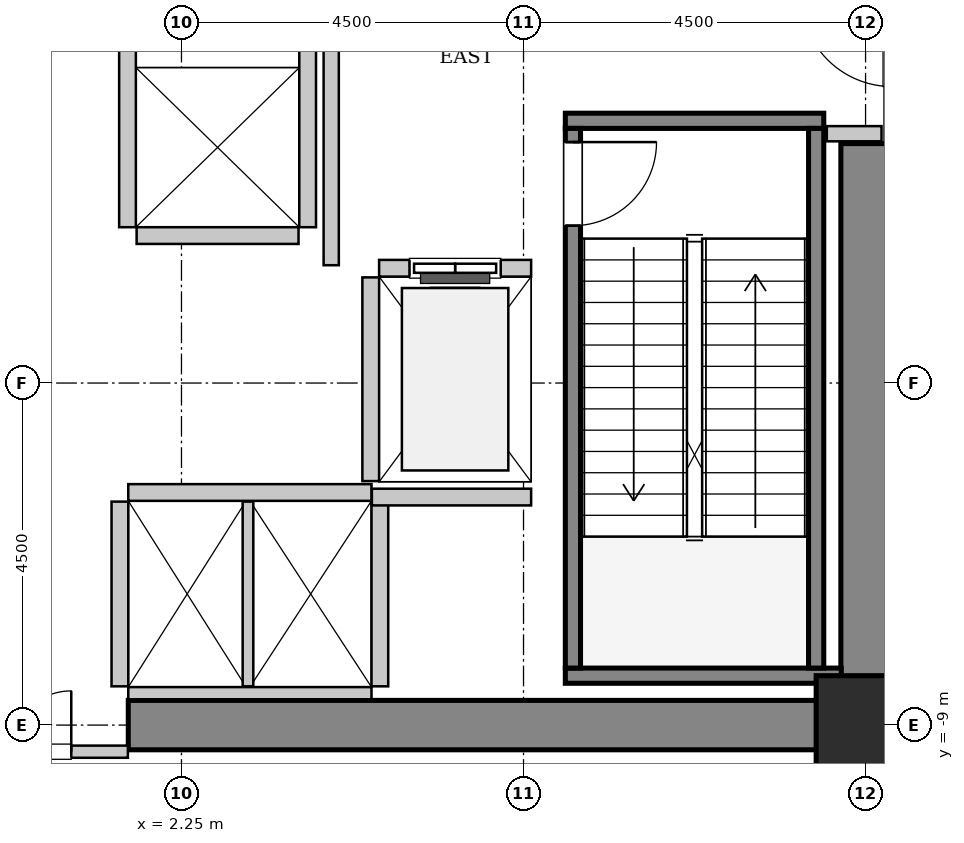
"""IFC4 building model, lengths in metres.
Left out: names, types, materials, properties, quantities, classifications, styles, units other than length and angle.
Written with IfcOpenShell. Run it as: python <this file> out.ifc"""

import sys

from ifc_helpers import new_model, si_unit, direction, frame, frame_2d, origin, origin_2d, place, context, subcontext, project, spatial, rectangle, hollow_rectangle, extrude, source, transform, mapped, element, fill, save


model = new_model("IFC4")
c1 = context("Model", 3, precision=1e-05, world=origin(), true_north=direction((0.0, 1.0)))
c2 = subcontext(c1, "Body", "Model", "MODEL_VIEW")
j1 = project(units=[si_unit("LENGTHUNIT", "METRE"), si_unit("PLANEANGLEUNIT", "RADIAN")], contexts=[c1])
p1 = place(None, origin())
s1 = spatial("IfcSite", under=j1, at=p1, CompositionType="ELEMENT")
p2 = place(p1, origin())
s2 = spatial("IfcBuilding", under=s1, at=p2, CompositionType="ELEMENT")
p3 = place(p2, frame((0.0, 0.0, 11.4)))
s3 = spatial("IfcBuildingStorey", under=s2, at=p3, CompositionType="ELEMENT", Elevation=11.4)
m1 = source(origin(), c2, "Body", "SweptSolid", [
    extrude(rectangle(XDim=10.025, YDim=0.65, at=frame_2d((5.012, 0.0))), origin(), (0.0, 0.0, 1.0), 5.4),
])
p4 = place(p3, frame((1.55, -9.0, 0.0), z_axis=(0.0, 0.0, 1.0), x_axis=(1.0, 0.0, 0.0)))
e1 = element("IfcWall", 1, at=p4, inside=s3, PredefinedType="SHEAR", context=c2, shape_type="MappedRepresentation", body=[
    mapped(m1, transform((0.0, 0.0, 0.0), x_axis=(1.0, 0.0, 0.0), y_axis=(0.0, 1.0, 0.0), z_axis=(0.0, 0.0, 1.0), scale=1.0)),
])
m2 = source(origin(), c2, "Body", "SweptSolid", [
    extrude(rectangle(XDim=7.325, YDim=0.65, at=frame_2d((3.663, 0.0))), origin(), (0.0, 0.0, 1.0), 5.4),
])
p5 = place(p3, frame((11.25, -8.675, 0.0), z_axis=(0.0, 0.0, 1.0), x_axis=(0.0, 1.0, 0.0)))
e2 = element("IfcWall", 2, at=p5, inside=s3, PredefinedType="SHEAR", context=c2, shape_type="MappedRepresentation", body=[
    mapped(m2, transform((0.0, 0.0, 0.0), x_axis=(1.0, 0.0, 0.0), y_axis=(0.0, 1.0, 0.0), z_axis=(0.0, 0.0, 1.0), scale=1.0)),
])
m3 = source(origin(), c2, "Body", "SweptSolid", [
    extrude(hollow_rectangle(XDim=1.3, YDim=1.3, WallThickness=0.065, InnerFilletRadius=0.065, OuterFilletRadius=0.13, at=origin_2d()), origin(), (0.0, 0.0, 1.0), 5.4),
])
p6 = place(p3, frame((11.25, -9.0, 0.0), z_axis=(0.0, 0.0, 1.0), x_axis=(1.0, 0.0, 0.0)))
e3 = element("IfcColumn", 3, at=p6, inside=s3, PredefinedType="COLUMN", context=c2, shape_type="MappedRepresentation", body=[
    mapped(m3, transform((0.0, 0.0, 0.0), x_axis=(1.0, 0.0, 0.0), y_axis=(0.0, 1.0, 0.0), z_axis=(0.0, 0.0, 1.0), scale=1.0)),
])
m4 = source(origin(), c2, "Body", "SweptSolid", [
    extrude(rectangle(XDim=3.4, YDim=0.2, at=frame_2d((1.7, 0.0))), origin(), (0.0, 0.0, 1.0), 5.4),
])
p7 = place(p3, frame((7.3, -1.05, 0.0), z_axis=(0.0, 0.0, 1.0), x_axis=(1.0, 0.0, 0.0)))
e4 = element("IfcWall", 4, at=p7, inside=s3, PredefinedType="SOLIDWALL", context=c2, shape_type="MappedRepresentation", body=[
    mapped(m4, transform((0.0, 0.0, 0.0), x_axis=(1.0, 0.0, 0.0), y_axis=(0.0, 1.0, 0.0), z_axis=(0.0, 0.0, 1.0), scale=1.0)),
])
m5 = source(origin(), c2, "Body", "SweptSolid", [
    extrude(rectangle(XDim=3.63, YDim=0.2, at=frame_2d((1.815, 0.0))), origin(), (0.0, 0.0, 1.0), 5.4),
])
p8 = place(p3, frame((7.3, -8.35, 0.0), z_axis=(0.0, 0.0, 1.0), x_axis=(1.0, 0.0, 0.0)))
e5 = element("IfcWall", 5, at=p8, inside=s3, PredefinedType="SOLIDWALL", context=c2, shape_type="MappedRepresentation", body=[
    mapped(m5, transform((0.0, 0.0, 0.0), x_axis=(1.0, 0.0, 0.0), y_axis=(0.0, 1.0, 0.0), z_axis=(0.0, 0.0, 1.0), scale=1.0)),
])
m6 = source(origin(), c2, "Body", "SweptSolid", [
    extrude(rectangle(XDim=7.1, YDim=0.2, at=frame_2d((3.55, 0.0))), origin(), (0.0, 0.0, 1.0), 5.4),
])
p9 = place(p3, frame((7.4, -1.15, 0.0), z_axis=(0.0, 0.0, 1.0), x_axis=(0.0, -1.0, 0.0)))
e6 = element("IfcWall", 6, at=p9, inside=s3, PredefinedType="SOLIDWALL", context=c2, shape_type="MappedRepresentation", body=[
    mapped(m6, transform((0.0, 0.0, 0.0), x_axis=(1.0, 0.0, 0.0), y_axis=(0.0, 1.0, 0.0), z_axis=(0.0, 0.0, 1.0), scale=1.0)),
])
p10 = place(p9, frame((0.18, 0.0, 0.0)))
e7 = element("IfcOpeningElement", 7, at=p10, cuts=e6, PredefinedType="OPENING", context=c2, shape_type="SweptSolid", body=[
    extrude(rectangle(XDim=1.1, YDim=2.15, at=frame_2d((0.55, 1.075))), frame((0.0, 0.11, 0.0), z_axis=(0.0, -1.0, 0.0), x_axis=(1.0, 0.0, 0.0)), (0.0, 0.0, 1.0), 0.22),
])
p11 = place(p3, frame((10.6, -1.15, 0.0), z_axis=(0.0, 0.0, 1.0), x_axis=(0.0, -1.0, 0.0)))
e8 = element("IfcWall", 8, at=p11, inside=s3, PredefinedType="SOLIDWALL", context=c2, shape_type="MappedRepresentation", body=[
    mapped(m6, transform((0.0, 0.0, 0.0), x_axis=(1.0, 0.0, 0.0), y_axis=(0.0, 1.0, 0.0), z_axis=(0.0, 0.0, 1.0), scale=1.0)),
])
m7 = source(origin(), c2, "Body", "SweptSolid", [
    extrude(rectangle(XDim=2.0, YDim=0.22, at=frame_2d((1.0, 0.0))), origin(), (0.0, 0.0, 1.0), 5.085),
])
p12 = place(p3, frame((6.85, -2.99, 0.0), z_axis=(0.0, 0.0, 1.0), x_axis=(-1.0, 0.0, 0.0)))
e9 = element("IfcWall", 9, at=p12, inside=s3, PredefinedType="SOLIDWALL", context=c2, shape_type="MappedRepresentation", body=[
    mapped(m7, transform((0.0, 0.0, 0.0), x_axis=(1.0, 0.0, 0.0), y_axis=(0.0, 1.0, 0.0), z_axis=(0.0, 0.0, 1.0), scale=1.0)),
])
p13 = place(p12, frame((0.4, 0.0, 0.0)))
e10 = element("IfcOpeningElement", 10, at=p13, cuts=e9, PredefinedType="OPENING", context=c2, shape_type="SweptSolid", body=[
    extrude(rectangle(XDim=1.2, YDim=2.2, at=frame_2d((0.6, 1.1))), frame((0.0, 0.12, 0.0), z_axis=(0.0, -1.0, 0.0), x_axis=(1.0, 0.0, 0.0)), (0.0, 0.0, 1.0), 0.24),
])
m8 = source(origin(), c2, "Body", "SweptSolid", [
    extrude(rectangle(XDim=2.68, YDim=0.22, at=frame_2d((1.34, 0.0))), origin(), (0.0, 0.0, 1.0), 5.085),
])
p14 = place(p3, frame((4.74, -3.11, 0.0), z_axis=(0.0, 0.0, 1.0), x_axis=(0.0, -1.0, 0.0)))
e11 = element("IfcWall", 11, at=p14, inside=s3, PredefinedType="SOLIDWALL", context=c2, shape_type="MappedRepresentation", body=[
    mapped(m8, transform((0.0, 0.0, 0.0), x_axis=(1.0, 0.0, 0.0), y_axis=(0.0, 1.0, 0.0), z_axis=(0.0, 0.0, 1.0), scale=1.0)),
])
m9 = source(origin(), c2, "Body", "SweptSolid", [
    extrude(rectangle(XDim=3.2, YDim=0.22, at=frame_2d((1.6, 0.0))), origin(), (0.0, 0.0, 1.0), 5.085),
])
p15 = place(p3, frame((4.75, -5.94, 0.0), z_axis=(0.0, 0.0, 1.0), x_axis=(-1.0, 0.0, 0.0)))
e12 = element("IfcWall", 12, at=p15, inside=s3, PredefinedType="SOLIDWALL", context=c2, shape_type="MappedRepresentation", body=[
    mapped(m9, transform((0.0, 0.0, 0.0), x_axis=(1.0, 0.0, 0.0), y_axis=(0.0, 1.0, 0.0), z_axis=(0.0, 0.0, 1.0), scale=1.0)),
])
m10 = source(origin(), c2, "Body", "SweptSolid", [
    extrude(rectangle(XDim=3.2, YDim=0.16, at=frame_2d((1.6, 0.0))), origin(), (0.0, 0.0, 1.0), 3.975),
])
p16 = place(p3, frame((1.55, -8.58, 0.0), z_axis=(0.0, 0.0, 1.0), x_axis=(1.0, 0.0, 0.0)))
e13 = element("IfcWall", 13, at=p16, inside=s3, PredefinedType="PARTITIONING", context=c2, shape_type="MappedRepresentation", body=[
    mapped(m10, transform((0.0, 0.0, 0.0), x_axis=(1.0, 0.0, 0.0), y_axis=(0.0, 1.0, 0.0), z_axis=(0.0, 0.0, 1.0), scale=1.0)),
])
m11 = source(origin(), c2, "Body", "SweptSolid", [
    extrude(rectangle(XDim=2.43, YDim=0.22, at=frame_2d((1.215, 0.0))), origin(), (0.0, 0.0, 1.0), 5.085),
])
p17 = place(p3, frame((1.44, -6.06, 0.0), z_axis=(0.0, 0.0, 1.0), x_axis=(0.0, -1.0, 0.0)))
e14 = element("IfcWall", 14, at=p17, inside=s3, PredefinedType="SOLIDWALL", context=c2, shape_type="MappedRepresentation", body=[
    mapped(m11, transform((0.0, 0.0, 0.0), x_axis=(1.0, 0.0, 0.0), y_axis=(0.0, 1.0, 0.0), z_axis=(0.0, 0.0, 1.0), scale=1.0)),
])
m12 = source(origin(), c2, "Body", "SweptSolid", [
    extrude(rectangle(XDim=2.43, YDim=0.14, at=frame_2d((1.215, 0.0))), origin(), (0.0, 0.0, 1.0), 5.085),
])
p18 = place(p3, frame((3.125, -8.49, 0.0), z_axis=(0.0, 0.0, 1.0), x_axis=(0.0, 1.0, 0.0)))
e15 = element("IfcWall", 15, at=p18, inside=s3, PredefinedType="PARTITIONING", context=c2, shape_type="MappedRepresentation", body=[
    mapped(m12, transform((0.0, 0.0, 0.0), x_axis=(1.0, 0.0, 0.0), y_axis=(0.0, 1.0, 0.0), z_axis=(0.0, 0.0, 1.0), scale=1.0)),
])
p19 = place(p3, frame((4.86, -8.49, 0.0), z_axis=(0.0, 0.0, 1.0), x_axis=(0.0, 1.0, 0.0)))
e16 = element("IfcWall", 16, at=p19, inside=s3, PredefinedType="SOLIDWALL", context=c2, shape_type="MappedRepresentation", body=[
    mapped(m11, transform((0.0, 0.0, 0.0), x_axis=(1.0, 0.0, 0.0), y_axis=(0.0, 1.0, 0.0), z_axis=(0.0, 0.0, 1.0), scale=1.0)),
])
m13 = source(origin(), c2, "Body", "SweptSolid", [
    extrude(rectangle(XDim=4.9, YDim=0.22, at=frame_2d((2.45, 0.0))), origin(), (0.0, 0.0, 1.0), 5.085),
])
for number, where, z_axis, x_axis in (
    (17, (1.54, 2.45, 0.0), (0.0, 0.0, 1.0), (0.0, -1.0, 0.0)),
    (18, (3.91, -2.45, 0.0), (0.0, 0.0, 1.0), (0.0, 1.0, 0.0)),
):
    element("IfcWall", number, at=place(p3, frame(where, z_axis=z_axis, x_axis=x_axis)), inside=s3, PredefinedType="SOLIDWALL", context=c2, shape_type="MappedRepresentation", body=[
        mapped(m13, transform((0.0, 0.0, 0.0), x_axis=(1.0, 0.0, 0.0), y_axis=(0.0, 1.0, 0.0), z_axis=(0.0, 0.0, 1.0), scale=1.0)),
    ])
m14 = source(origin(), c2, "Body", "SweptSolid", [
    extrude(rectangle(XDim=2.13, YDim=0.22, at=frame_2d((1.065, 0.0))), origin(), (0.0, 0.0, 1.0), 5.085),
])
p20 = place(p3, frame((1.66, -2.56, 0.0), z_axis=(0.0, 0.0, 1.0), x_axis=(1.0, 0.0, 0.0)))
e19 = element("IfcWall", 19, at=p20, inside=s3, PredefinedType="SOLIDWALL", context=c2, shape_type="MappedRepresentation", body=[
    mapped(m14, transform((0.0, 0.0, 0.0), x_axis=(1.0, 0.0, 0.0), y_axis=(0.0, 1.0, 0.0), z_axis=(0.0, 0.0, 1.0), scale=1.0)),
])
m15 = source(origin(), c2, "Body", "SweptSolid", [
    extrude(rectangle(XDim=2.095, YDim=0.22, at=frame_2d((1.048, 0.0))), origin(), (0.0, 0.0, 1.0), 5.085),
])
p21 = place(p3, frame((4.755, -6.0, 0.0), z_axis=(0.0, 0.0, 1.0), x_axis=(1.0, 0.0, 0.0)))
e20 = element("IfcWall", 20, at=p21, inside=s3, PredefinedType="SOLIDWALL", context=c2, shape_type="MappedRepresentation", body=[
    mapped(m15, transform((0.0, 0.0, 0.0), x_axis=(1.0, 0.0, 0.0), y_axis=(0.0, 1.0, 0.0), z_axis=(0.0, 0.0, 1.0), scale=1.0)),
])
m16 = source(origin(), c2, "Body", "SweptSolid", [
    extrude(rectangle(XDim=5.9, YDim=0.2, at=frame_2d((2.95, 0.0))), origin(), (0.0, 0.0, 1.0), 5.085),
])
p22 = place(p3, frame((4.22, -2.95, 0.0), z_axis=(0.0, 0.0, 1.0), x_axis=(0.0, 1.0, 0.0)))
e21 = element("IfcWall", 21, at=p22, inside=s3, PredefinedType="PARTITIONING", context=c2, shape_type="MappedRepresentation", body=[
    mapped(m16, transform((0.0, 0.0, 0.0), x_axis=(1.0, 0.0, 0.0), y_axis=(0.0, 1.0, 0.0), z_axis=(0.0, 0.0, 1.0), scale=1.0)),
])
m17 = source(origin(), c2, "Body", "SweptSolid", [
    extrude(rectangle(XDim=0.72, YDim=0.2, at=frame_2d((0.36, 0.0))), origin(), (0.0, 0.0, 1.0), 5.085),
])
p23 = place(p3, frame((10.74, -1.22, 0.0), z_axis=(0.0, 0.0, 1.0), x_axis=(1.0, 0.0, 0.0)))
e22 = element("IfcWall", 22, at=p23, inside=s3, PredefinedType="PARTITIONING", context=c2, shape_type="MappedRepresentation", body=[
    mapped(m17, transform((0.0, 0.0, 0.0), x_axis=(1.0, 0.0, 0.0), y_axis=(0.0, 1.0, 0.0), z_axis=(0.0, 0.0, 1.0), scale=1.0)),
])
m18 = source(origin(), c2, "Body", "SweptSolid", [
    extrude(rectangle(XDim=3.09, YDim=0.16, at=frame_2d((1.545, 0.0))), origin(), (0.0, 0.0, 1.0), 3.975),
])
p24 = place(p3, frame((-1.545, -9.35, 0.0), z_axis=(0.0, 0.0, 1.0), x_axis=(1.0, 0.0, 0.0)))
e23 = element("IfcWall", 23, at=p24, inside=s3, PredefinedType="PARTITIONING", context=c2, shape_type="MappedRepresentation", body=[
    mapped(m18, transform((0.0, 0.0, 0.0), x_axis=(1.0, 0.0, 0.0), y_axis=(0.0, 1.0, 0.0), z_axis=(0.0, 0.0, 1.0), scale=1.0)),
])
p25 = place(p24, frame((0.745, 0.0, 0.0)))
e24 = element("IfcOpeningElement", 24, at=p25, cuts=e23, PredefinedType="OPENING", context=c2, shape_type="SweptSolid", body=[
    extrude(rectangle(XDim=1.6, YDim=2.3, at=frame_2d((0.8, 1.15))), frame((0.0, 0.09, 0.0), z_axis=(0.0, -1.0, 0.0), x_axis=(1.0, 0.0, 0.0)), (0.0, 0.0, 1.0), 0.18),
])
m19 = source(origin(), c2, "Body", "SweptSolid", [
    extrude(rectangle(XDim=1.1, YDim=2.15, at=frame_2d((0.55, 1.075))), frame((0.0, 0.025, 0.0), z_axis=(0.0, -1.0, 0.0), x_axis=(1.0, 0.0, 0.0)), (0.0, 0.0, 1.0), 0.05),
])
p26 = place(p10, origin())
e25 = element("IfcDoor", 25, at=p26, inside=s3, OperationType="SINGLE_SWING_LEFT", PredefinedType="DOOR", context=c2, shape_type="MappedRepresentation", body=[
    mapped(m19, transform((0.0, 0.0, 0.0), x_axis=(1.0, 0.0, 0.0), y_axis=(0.0, 1.0, 0.0), z_axis=(0.0, 0.0, 1.0), scale=1.0)),
])
fill(e7, e25)
m20 = source(origin(), c2, "Body", "SweptSolid", [
    extrude(rectangle(XDim=1.2, YDim=2.2, at=frame_2d((0.6, 1.1))), frame((0.0, 0.025, 0.0), z_axis=(0.0, -1.0, 0.0), x_axis=(1.0, 0.0, 0.0)), (0.0, 0.0, 1.0), 0.05),
])
p27 = place(p13, origin())
e26 = element("IfcDoor", 26, at=p27, inside=s3, OperationType="SLIDING_TO_LEFT", PredefinedType="DOOR", context=c2, shape_type="MappedRepresentation", body=[
    mapped(m20, transform((0.0, 0.0, 0.0), x_axis=(1.0, 0.0, 0.0), y_axis=(0.0, 1.0, 0.0), z_axis=(0.0, 0.0, 1.0), scale=1.0)),
])
fill(e10, e26)
m21 = source(origin(), c2, "Body", "SweptSolid", [
    extrude(rectangle(XDim=1.6, YDim=2.3, at=frame_2d((0.8, 1.15))), frame((0.0, 0.025, 0.0), z_axis=(0.0, -1.0, 0.0), x_axis=(1.0, 0.0, 0.0)), (0.0, 0.0, 1.0), 0.05),
])
p28 = place(p25, origin())
e27 = element("IfcDoor", 27, at=p28, inside=s3, OperationType="DOUBLE_DOOR_SINGLE_SWING", PredefinedType="DOOR", context=c2, shape_type="MappedRepresentation", body=[
    mapped(m21, transform((0.0, 0.0, 0.0), x_axis=(1.0, 0.0, 0.0), y_axis=(0.0, 1.0, 0.0), z_axis=(0.0, 0.0, 1.0), scale=1.0)),
])
fill(e24, e27)
save(model, sys.argv[1])
